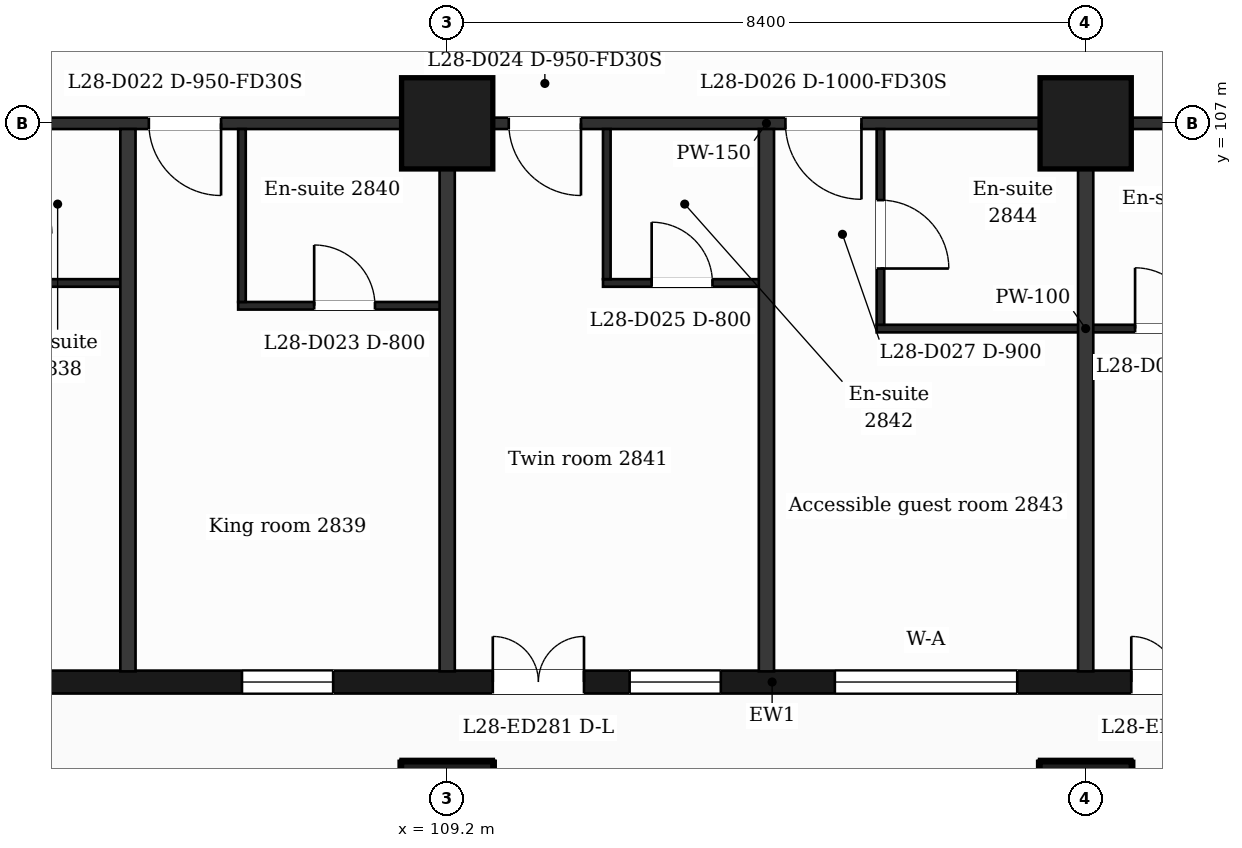
"""IFC4 building model, lengths in metres.
Left out: names, types, materials, properties, quantities, classifications, styles, units other than length and angle.
Written with IfcOpenShell. Run it as: python <this file> out.ifc"""

import sys

from ifc_helpers import new_model, si_unit, direction, frame, frame_2d, origin, origin_2d, place, context, subcontext, project, spatial, rectangle, extrude, element, fill, save


model = new_model("IFC4")
c1 = context("Model", 3, precision=1e-05, world=origin(), true_north=direction((0.0, 1.0)))
c2 = subcontext(c1, "Body", "Model", "MODEL_VIEW")
j1 = project(units=[si_unit("LENGTHUNIT", "METRE"), si_unit("PLANEANGLEUNIT", "RADIAN")], contexts=[c1])
p1 = place(None, origin())
s1 = spatial("IfcSite", under=j1, at=p1, CompositionType="ELEMENT")
p2 = place(p1, origin())
s2 = spatial("IfcBuilding", under=s1, at=p2, CompositionType="ELEMENT")
p3 = place(p2, frame((0.0, 0.0, 120.6)))
s3 = spatial("IfcBuildingStorey", under=s2, at=p3, CompositionType="ELEMENT", Elevation=120.6)
for number, where, z_axis, x_axis in (
    (1, (109.2, 98.0, 0.0), (0.0, 0.0, 1.0), (1.0, 0.0, 0.0)),
    (2, (117.6, 98.0, 0.0), (0.0, 0.0, 1.0), (1.0, 0.0, 0.0)),
    (3, (109.2, 107.0, 0.0), (0.0, 0.0, 1.0), (1.0, 0.0, 0.0)),
    (4, (117.6, 107.0, 0.0), (0.0, 0.0, 1.0), (1.0, 0.0, 0.0)),
):
    element("IfcColumn", number, at=place(p3, frame(where, z_axis=z_axis, x_axis=x_axis)), inside=s3, PredefinedType="COLUMN", context=c2, shape_type="SweptSolid", body=[
        extrude(rectangle(XDim=1.2, YDim=1.2, at=origin_2d()), origin(), (0.0, 0.0, 1.0), 3.7),
    ])
p4 = place(p3, frame((89.85, 99.65, 0.0), z_axis=(0.0, 0.0, 1.0), x_axis=(1.0, 0.0, 0.0)))
e5 = element("IfcWall", 5, at=p4, inside=s3, PredefinedType="SOLIDWALL", context=c2, shape_type="SweptSolid", body=[
    extrude(rectangle(XDim=47.25, YDim=0.3, at=frame_2d((23.625, 0.0))), origin(), (0.0, 0.0, 1.0), 3.38),
])
p5 = place(p4, frame((0.725, 0.0, 0.9)))
e6 = element("IfcOpeningElement", 6, at=p5, cuts=e5, PredefinedType="OPENING", context=c2, shape_type="SweptSolid", body=[
    extrude(rectangle(XDim=1.2, YDim=2.1, at=frame_2d((0.6, 1.05))), frame((0.0, 0.16, 0.0), z_axis=(0.0, -1.0, 0.0), x_axis=(1.0, 0.0, 0.0)), (0.0, 0.0, 1.0), 0.32),
])
p6 = place(p4, frame((3.45, 0.0, 0.9)))
e7 = element("IfcOpeningElement", 7, at=p6, cuts=e5, PredefinedType="OPENING", context=c2, shape_type="SweptSolid", body=[
    extrude(rectangle(XDim=2.4, YDim=2.1, at=frame_2d((1.2, 1.05))), frame((0.0, 0.16, 0.0), z_axis=(0.0, -1.0, 0.0), x_axis=(1.0, 0.0, 0.0)), (0.0, 0.0, 1.0), 0.32),
])
p7 = place(p4, frame((7.65, 0.0, 0.9)))
e8 = element("IfcOpeningElement", 8, at=p7, cuts=e5, PredefinedType="OPENING", context=c2, shape_type="SweptSolid", body=[
    extrude(rectangle(XDim=2.4, YDim=2.1, at=frame_2d((1.2, 1.05))), frame((0.0, 0.16, 0.0), z_axis=(0.0, -1.0, 0.0), x_axis=(1.0, 0.0, 0.0)), (0.0, 0.0, 1.0), 0.32),
])
p8 = place(p4, frame((12.45, 0.0, 0.9)))
e9 = element("IfcOpeningElement", 9, at=p8, cuts=e5, PredefinedType="OPENING", context=c2, shape_type="SweptSolid", body=[
    extrude(rectangle(XDim=1.2, YDim=2.1, at=frame_2d((0.6, 1.05))), frame((0.0, 0.16, 0.0), z_axis=(0.0, -1.0, 0.0), x_axis=(1.0, 0.0, 0.0)), (0.0, 0.0, 1.0), 0.32),
])
p9 = place(p4, frame((16.65, 0.0, 0.9)))
e10 = element("IfcOpeningElement", 10, at=p9, cuts=e5, PredefinedType="OPENING", context=c2, shape_type="SweptSolid", body=[
    extrude(rectangle(XDim=1.2, YDim=2.1, at=frame_2d((0.6, 1.05))), frame((0.0, 0.16, 0.0), z_axis=(0.0, -1.0, 0.0), x_axis=(1.0, 0.0, 0.0)), (0.0, 0.0, 1.0), 0.32),
])
p10 = place(p4, frame((19.95, 0.0, 0.0)))
e11 = element("IfcOpeningElement", 11, at=p10, cuts=e5, PredefinedType="OPENING", context=c2, shape_type="SweptSolid", body=[
    extrude(rectangle(XDim=1.2, YDim=2.4, at=frame_2d((0.6, 1.2))), frame((0.0, 0.16, 0.0), z_axis=(0.0, -1.0, 0.0), x_axis=(1.0, 0.0, 0.0)), (0.0, 0.0, 1.0), 0.32),
])
p11 = place(p4, frame((21.75, 0.0, 0.9)))
e12 = element("IfcOpeningElement", 12, at=p11, cuts=e5, PredefinedType="OPENING", context=c2, shape_type="SweptSolid", body=[
    extrude(rectangle(XDim=1.2, YDim=2.1, at=frame_2d((0.6, 1.05))), frame((0.0, 0.16, 0.0), z_axis=(0.0, -1.0, 0.0), x_axis=(1.0, 0.0, 0.0)), (0.0, 0.0, 1.0), 0.32),
])
p12 = place(p4, frame((24.45, 0.0, 0.9)))
e13 = element("IfcOpeningElement", 13, at=p12, cuts=e5, PredefinedType="OPENING", context=c2, shape_type="SweptSolid", body=[
    extrude(rectangle(XDim=2.4, YDim=2.1, at=frame_2d((1.2, 1.05))), frame((0.0, 0.16, 0.0), z_axis=(0.0, -1.0, 0.0), x_axis=(1.0, 0.0, 0.0)), (0.0, 0.0, 1.0), 0.32),
])
p13 = place(p4, frame((28.35, 0.0, 0.0)))
e14 = element("IfcOpeningElement", 14, at=p13, cuts=e5, PredefinedType="OPENING", context=c2, shape_type="SweptSolid", body=[
    extrude(rectangle(XDim=1.2, YDim=2.4, at=frame_2d((0.6, 1.2))), frame((0.0, 0.16, 0.0), z_axis=(0.0, -1.0, 0.0), x_axis=(1.0, 0.0, 0.0)), (0.0, 0.0, 1.0), 0.32),
])
p14 = place(p4, frame((30.15, 0.0, 0.9)))
e15 = element("IfcOpeningElement", 15, at=p14, cuts=e5, PredefinedType="OPENING", context=c2, shape_type="SweptSolid", body=[
    extrude(rectangle(XDim=1.2, YDim=2.1, at=frame_2d((0.6, 1.05))), frame((0.0, 0.16, 0.0), z_axis=(0.0, -1.0, 0.0), x_axis=(1.0, 0.0, 0.0)), (0.0, 0.0, 1.0), 0.32),
])
p15 = place(p4, frame((32.85, 0.0, 0.9)))
e16 = element("IfcOpeningElement", 16, at=p15, cuts=e5, PredefinedType="OPENING", context=c2, shape_type="SweptSolid", body=[
    extrude(rectangle(XDim=2.4, YDim=2.1, at=frame_2d((1.2, 1.05))), frame((0.0, 0.16, 0.0), z_axis=(0.0, -1.0, 0.0), x_axis=(1.0, 0.0, 0.0)), (0.0, 0.0, 1.0), 0.32),
])
p16 = place(p4, frame((37.05, 0.0, 0.9)))
e17 = element("IfcOpeningElement", 17, at=p16, cuts=e5, PredefinedType="OPENING", context=c2, shape_type="SweptSolid", body=[
    extrude(rectangle(XDim=2.4, YDim=2.1, at=frame_2d((1.2, 1.05))), frame((0.0, 0.16, 0.0), z_axis=(0.0, -1.0, 0.0), x_axis=(1.0, 0.0, 0.0)), (0.0, 0.0, 1.0), 0.32),
])
p17 = place(p4, frame((41.85, 0.0, 0.9)))
e18 = element("IfcOpeningElement", 18, at=p17, cuts=e5, PredefinedType="OPENING", context=c2, shape_type="SweptSolid", body=[
    extrude(rectangle(XDim=1.2, YDim=2.1, at=frame_2d((0.6, 1.05))), frame((0.0, 0.16, 0.0), z_axis=(0.0, -1.0, 0.0), x_axis=(1.0, 0.0, 0.0)), (0.0, 0.0, 1.0), 0.32),
])
p18 = place(p4, frame((45.25, 0.0, 0.9)))
e19 = element("IfcOpeningElement", 19, at=p18, cuts=e5, PredefinedType="OPENING", context=c2, shape_type="SweptSolid", body=[
    extrude(rectangle(XDim=1.2, YDim=2.1, at=frame_2d((0.6, 1.05))), frame((0.0, 0.16, 0.0), z_axis=(0.0, -1.0, 0.0), x_axis=(1.0, 0.0, 0.0)), (0.0, 0.0, 1.0), 0.32),
])
p19 = place(p3, frame((114.85, 104.3, 0.0), z_axis=(0.0, 0.0, 1.0), x_axis=(1.0, 0.0, 0.0)))
e20 = element("IfcWall", 20, at=p19, inside=s3, PredefinedType="PARTITIONING", context=c2, shape_type="SweptSolid", body=[
    extrude(rectangle(XDim=5.5, YDim=0.1, at=frame_2d((2.75, 0.0))), origin(), (0.0, 0.0, 1.0), 3.38),
])
p20 = place(p19, frame((3.4, 0.0, 0.0)))
e21 = element("IfcOpeningElement", 21, at=p20, cuts=e20, PredefinedType="OPENING", context=c2, shape_type="SweptSolid", body=[
    extrude(rectangle(XDim=0.8, YDim=2.1, at=frame_2d((0.4, 1.05))), frame((0.0, 0.06, 0.0), z_axis=(0.0, -1.0, 0.0), x_axis=(1.0, 0.0, 0.0)), (0.0, 0.0, 1.0), 0.12),
])
p21 = place(p3, frame((106.45, 104.6, 0.0), z_axis=(0.0, 0.0, 1.0), x_axis=(1.0, 0.0, 0.0)))
e22 = element("IfcWall", 22, at=p21, inside=s3, PredefinedType="PARTITIONING", context=c2, shape_type="SweptSolid", body=[
    extrude(rectangle(XDim=2.75, YDim=0.1, at=frame_2d((1.375, 0.0))), origin(), (0.0, 0.0, 1.0), 3.38),
])
p22 = place(p21, frame((1.0, 0.0, 0.0)))
e23 = element("IfcOpeningElement", 23, at=p22, cuts=e22, PredefinedType="OPENING", context=c2, shape_type="SweptSolid", body=[
    extrude(rectangle(XDim=0.8, YDim=2.1, at=frame_2d((0.4, 1.05))), frame((0.0, 0.06, 0.0), z_axis=(0.0, -1.0, 0.0), x_axis=(1.0, 0.0, 0.0)), (0.0, 0.0, 1.0), 0.12),
])
p23 = place(p3, frame((103.15, 104.9, 0.0), z_axis=(0.0, 0.0, 1.0), x_axis=(1.0, 0.0, 0.0)))
e24 = element("IfcWall", 24, at=p23, inside=s3, PredefinedType="PARTITIONING", context=c2, shape_type="SweptSolid", body=[
    extrude(rectangle(XDim=1.85, YDim=0.1, at=frame_2d((0.925, 0.0))), origin(), (0.0, 0.0, 1.0), 3.38),
])
p24 = place(p3, frame((111.25, 104.9, 0.0), z_axis=(0.0, 0.0, 1.0), x_axis=(1.0, 0.0, 0.0)))
e25 = element("IfcWall", 25, at=p24, inside=s3, PredefinedType="PARTITIONING", context=c2, shape_type="SweptSolid", body=[
    extrude(rectangle(XDim=2.15, YDim=0.1, at=frame_2d((1.075, 0.0))), origin(), (0.0, 0.0, 1.0), 3.38),
])
p25 = place(p24, frame((0.64, 0.0, 0.0)))
e26 = element("IfcOpeningElement", 26, at=p25, cuts=e25, PredefinedType="OPENING", context=c2, shape_type="SweptSolid", body=[
    extrude(rectangle(XDim=0.8, YDim=2.1, at=frame_2d((0.4, 1.05))), frame((0.0, 0.06, 0.0), z_axis=(0.0, -1.0, 0.0), x_axis=(1.0, 0.0, 0.0)), (0.0, 0.0, 1.0), 0.12),
])
p26 = place(p3, frame((87.018, 107.0, 0.0), z_axis=(0.0, 0.0, 1.0), x_axis=(1.0, 0.0, 0.0)))
e27 = element("IfcWall", 27, at=p26, inside=s3, PredefinedType="PARTITIONING", context=c2, shape_type="SweptSolid", body=[
    extrude(rectangle(XDim=52.765, YDim=0.15, at=frame_2d((26.382, 0.0))), origin(), (0.0, 0.0, 1.0), 3.38),
])
p27 = place(p26, frame((1.276, 0.0, 0.0)))
e28 = element("IfcOpeningElement", 28, at=p27, cuts=e27, PredefinedType="OPENING", context=c2, shape_type="SweptSolid", body=[
    extrude(rectangle(XDim=0.95, YDim=2.1, at=frame_2d((0.475, 1.05))), frame((0.0, 0.085, 0.0), z_axis=(0.0, -1.0, 0.0), x_axis=(1.0, 0.0, 0.0)), (0.0, 0.0, 1.0), 0.17),
])
p28 = place(p26, frame((6.192, 0.0, 0.0)))
e29 = element("IfcOpeningElement", 29, at=p28, cuts=e27, PredefinedType="OPENING", context=c2, shape_type="SweptSolid", body=[
    extrude(rectangle(XDim=0.95, YDim=2.1, at=frame_2d((0.475, 1.05))), frame((0.0, 0.085, 0.0), z_axis=(0.0, -1.0, 0.0), x_axis=(1.0, 0.0, 0.0)), (0.0, 0.0, 1.0), 0.17),
])
p29 = place(p26, frame((11.982, 0.0, 0.0)))
e30 = element("IfcOpeningElement", 30, at=p29, cuts=e27, PredefinedType="OPENING", context=c2, shape_type="SweptSolid", body=[
    extrude(rectangle(XDim=1.0, YDim=2.1, at=frame_2d((0.5, 1.05))), frame((0.0, 0.085, 0.0), z_axis=(0.0, -1.0, 0.0), x_axis=(1.0, 0.0, 0.0)), (0.0, 0.0, 1.0), 0.17),
])
p30 = place(p26, frame((14.582, 0.0, 0.0)))
e31 = element("IfcOpeningElement", 31, at=p30, cuts=e27, PredefinedType="OPENING", context=c2, shape_type="SweptSolid", body=[
    extrude(rectangle(XDim=0.95, YDim=2.1, at=frame_2d((0.475, 1.05))), frame((0.0, 0.085, 0.0), z_axis=(0.0, -1.0, 0.0), x_axis=(1.0, 0.0, 0.0)), (0.0, 0.0, 1.0), 0.17),
])
p31 = place(p26, frame((18.257, 0.0, 0.0)))
e32 = element("IfcOpeningElement", 32, at=p31, cuts=e27, PredefinedType="OPENING", context=c2, shape_type="SweptSolid", body=[
    extrude(rectangle(XDim=0.95, YDim=2.1, at=frame_2d((0.475, 1.05))), frame((0.0, 0.085, 0.0), z_axis=(0.0, -1.0, 0.0), x_axis=(1.0, 0.0, 0.0)), (0.0, 0.0, 1.0), 0.17),
])
p32 = place(p26, frame((22.992, 0.0, 0.0)))
e33 = element("IfcOpeningElement", 33, at=p32, cuts=e27, PredefinedType="OPENING", context=c2, shape_type="SweptSolid", body=[
    extrude(rectangle(XDim=0.95, YDim=2.1, at=frame_2d((0.475, 1.05))), frame((0.0, 0.085, 0.0), z_axis=(0.0, -1.0, 0.0), x_axis=(1.0, 0.0, 0.0)), (0.0, 0.0, 1.0), 0.17),
])
p33 = place(p26, frame((26.632, 0.0, 0.0)))
e34 = element("IfcOpeningElement", 34, at=p33, cuts=e27, PredefinedType="OPENING", context=c2, shape_type="SweptSolid", body=[
    extrude(rectangle(XDim=1.0, YDim=2.1, at=frame_2d((0.5, 1.05))), frame((0.0, 0.085, 0.0), z_axis=(0.0, -1.0, 0.0), x_axis=(1.0, 0.0, 0.0)), (0.0, 0.0, 1.0), 0.17),
])
p34 = place(p26, frame((33.557, 0.0, 0.0)))
e35 = element("IfcOpeningElement", 35, at=p34, cuts=e27, PredefinedType="OPENING", context=c2, shape_type="SweptSolid", body=[
    extrude(rectangle(XDim=0.95, YDim=2.1, at=frame_2d((0.475, 1.05))), frame((0.0, 0.085, 0.0), z_axis=(0.0, -1.0, 0.0), x_axis=(1.0, 0.0, 0.0)), (0.0, 0.0, 1.0), 0.17),
])
p35 = place(p26, frame((37.182, 0.0, 0.0)))
e36 = element("IfcOpeningElement", 36, at=p35, cuts=e27, PredefinedType="OPENING", context=c2, shape_type="SweptSolid", body=[
    extrude(rectangle(XDim=0.95, YDim=2.1, at=frame_2d((0.475, 1.05))), frame((0.0, 0.085, 0.0), z_axis=(0.0, -1.0, 0.0), x_axis=(1.0, 0.0, 0.0)), (0.0, 0.0, 1.0), 0.17),
])
p36 = place(p26, frame((41.957, 0.0, 0.0)))
e37 = element("IfcOpeningElement", 37, at=p36, cuts=e27, PredefinedType="OPENING", context=c2, shape_type="SweptSolid", body=[
    extrude(rectangle(XDim=0.95, YDim=2.1, at=frame_2d((0.475, 1.05))), frame((0.0, 0.085, 0.0), z_axis=(0.0, -1.0, 0.0), x_axis=(1.0, 0.0, 0.0)), (0.0, 0.0, 1.0), 0.17),
])
p37 = place(p26, frame((45.622, 0.0, 0.0)))
e38 = element("IfcOpeningElement", 38, at=p37, cuts=e27, PredefinedType="OPENING", context=c2, shape_type="SweptSolid", body=[
    extrude(rectangle(XDim=0.95, YDim=2.1, at=frame_2d((0.475, 1.05))), frame((0.0, 0.085, 0.0), z_axis=(0.0, -1.0, 0.0), x_axis=(1.0, 0.0, 0.0)), (0.0, 0.0, 1.0), 0.17),
])
p38 = place(p26, frame((48.56, 0.0, 0.0)))
e39 = element("IfcOpeningElement", 39, at=p38, cuts=e27, PredefinedType="OPENING", context=c2, shape_type="SweptSolid", body=[
    extrude(rectangle(XDim=0.95, YDim=2.1, at=frame_2d((0.475, 1.05))), frame((0.0, 0.085, 0.0), z_axis=(0.0, -1.0, 0.0), x_axis=(1.0, 0.0, 0.0)), (0.0, 0.0, 1.0), 0.17),
])
p39 = place(p3, frame((105.0, 99.79, 0.0), z_axis=(0.0, 0.0, 1.0), x_axis=(0.0, 1.0, 0.0)))
e40 = element("IfcWall", 40, at=p39, inside=s3, PredefinedType="PARTITIONING", context=c2, shape_type="SweptSolid", body=[
    extrude(rectangle(XDim=7.135, YDim=0.2, at=frame_2d((3.567, 0.0))), origin(), (0.0, 0.0, 1.0), 3.38),
])
p40 = place(p3, frame((106.5, 104.65, 0.0), z_axis=(0.0, 0.0, 1.0), x_axis=(0.0, 1.0, 0.0)))
e41 = element("IfcWall", 41, at=p40, inside=s3, PredefinedType="PARTITIONING", context=c2, shape_type="SweptSolid", body=[
    extrude(rectangle(XDim=2.275, YDim=0.1, at=frame_2d((1.138, 0.0))), origin(), (0.0, 0.0, 1.0), 3.38),
])
p41 = place(p3, frame((109.2, 99.79, 0.0), z_axis=(0.0, 0.0, 1.0), x_axis=(0.0, 1.0, 0.0)))
e42 = element("IfcWall", 42, at=p41, inside=s3, PredefinedType="PARTITIONING", context=c2, shape_type="SweptSolid", body=[
    extrude(rectangle(XDim=7.135, YDim=0.2, at=frame_2d((3.567, 0.0))), origin(), (0.0, 0.0, 1.0), 3.38),
])
p42 = place(p3, frame((111.3, 104.95, 0.0), z_axis=(0.0, 0.0, 1.0), x_axis=(0.0, 1.0, 0.0)))
e43 = element("IfcWall", 43, at=p42, inside=s3, PredefinedType="PARTITIONING", context=c2, shape_type="SweptSolid", body=[
    extrude(rectangle(XDim=1.975, YDim=0.1, at=frame_2d((0.988, 0.0))), origin(), (0.0, 0.0, 1.0), 3.38),
])
p43 = place(p3, frame((113.4, 99.79, 0.0), z_axis=(0.0, 0.0, 1.0), x_axis=(0.0, 1.0, 0.0)))
e44 = element("IfcWall", 44, at=p43, inside=s3, PredefinedType="PARTITIONING", context=c2, shape_type="SweptSolid", body=[
    extrude(rectangle(XDim=7.135, YDim=0.2, at=frame_2d((3.567, 0.0))), origin(), (0.0, 0.0, 1.0), 3.38),
])
p44 = place(p3, frame((114.9, 104.35, 0.0), z_axis=(0.0, 0.0, 1.0), x_axis=(0.0, 1.0, 0.0)))
e45 = element("IfcWall", 45, at=p44, inside=s3, PredefinedType="PARTITIONING", context=c2, shape_type="SweptSolid", body=[
    extrude(rectangle(XDim=2.575, YDim=0.1, at=frame_2d((1.288, 0.0))), origin(), (0.0, 0.0, 1.0), 3.38),
])
p45 = place(p44, frame((0.74, 0.0, 0.0)))
e46 = element("IfcOpeningElement", 46, at=p45, cuts=e45, PredefinedType="OPENING", context=c2, shape_type="SweptSolid", body=[
    extrude(rectangle(XDim=0.9, YDim=2.1, at=frame_2d((0.45, 1.05))), frame((0.0, 0.06, 0.0), z_axis=(0.0, -1.0, 0.0), x_axis=(1.0, 0.0, 0.0)), (0.0, 0.0, 1.0), 0.12),
])
p46 = place(p3, frame((117.6, 99.79, 0.0), z_axis=(0.0, 0.0, 1.0), x_axis=(0.0, 1.0, 0.0)))
e47 = element("IfcWall", 47, at=p46, inside=s3, PredefinedType="PARTITIONING", context=c2, shape_type="SweptSolid", body=[
    extrude(rectangle(XDim=7.135, YDim=0.2, at=frame_2d((3.567, 0.0))), origin(), (0.0, 0.0, 1.0), 3.38),
])
p47 = place(p9, origin())
e48 = element("IfcWindow", 48, at=p47, inside=s3, PartitioningType="SINGLE_PANEL", PredefinedType="WINDOW", context=c2, shape_type="SweptSolid", body=[
    extrude(rectangle(XDim=1.2, YDim=2.1, at=frame_2d((0.6, 1.05))), frame((0.0, 0.03, 0.0), z_axis=(0.0, -1.0, 0.0), x_axis=(1.0, 0.0, 0.0)), (0.0, 0.0, 1.0), 0.06),
])
fill(e10, e48)
p48 = place(p10, origin())
e49 = element("IfcDoor", 49, at=p48, inside=s3, OperationType="DOUBLE_DOOR_SINGLE_SWING", PredefinedType="DOOR", context=c2, shape_type="SweptSolid", body=[
    extrude(rectangle(XDim=1.2, YDim=2.4, at=frame_2d((0.6, 1.2))), frame((0.0, 0.025, 0.0), z_axis=(0.0, -1.0, 0.0), x_axis=(1.0, 0.0, 0.0)), (0.0, 0.0, 1.0), 0.05),
])
fill(e11, e49)
p49 = place(p11, origin())
e50 = element("IfcWindow", 50, at=p49, inside=s3, PartitioningType="SINGLE_PANEL", PredefinedType="WINDOW", context=c2, shape_type="SweptSolid", body=[
    extrude(rectangle(XDim=1.2, YDim=2.1, at=frame_2d((0.6, 1.05))), frame((0.0, 0.03, 0.0), z_axis=(0.0, -1.0, 0.0), x_axis=(1.0, 0.0, 0.0)), (0.0, 0.0, 1.0), 0.06),
])
fill(e12, e50)
p50 = place(p12, origin())
e51 = element("IfcWindow", 51, at=p50, inside=s3, PartitioningType="SINGLE_PANEL", PredefinedType="WINDOW", context=c2, shape_type="SweptSolid", body=[
    extrude(rectangle(XDim=2.4, YDim=2.1, at=frame_2d((1.2, 1.05))), frame((0.0, 0.03, 0.0), z_axis=(0.0, -1.0, 0.0), x_axis=(1.0, 0.0, 0.0)), (0.0, 0.0, 1.0), 0.06),
])
fill(e13, e51)
p51 = place(p13, origin())
e52 = element("IfcDoor", 52, at=p51, inside=s3, OperationType="DOUBLE_DOOR_SINGLE_SWING", PredefinedType="DOOR", context=c2, shape_type="SweptSolid", body=[
    extrude(rectangle(XDim=1.2, YDim=2.4, at=frame_2d((0.6, 1.2))), frame((0.0, 0.025, 0.0), z_axis=(0.0, -1.0, 0.0), x_axis=(1.0, 0.0, 0.0)), (0.0, 0.0, 1.0), 0.05),
])
fill(e14, e52)
p52 = place(p31, origin())
e53 = element("IfcDoor", 53, at=p52, inside=s3, OperationType="SINGLE_SWING_RIGHT", PredefinedType="DOOR", context=c2, shape_type="SweptSolid", body=[
    extrude(rectangle(XDim=0.95, YDim=2.1, at=frame_2d((0.475, 1.05))), frame((0.0, 0.025, 0.0), z_axis=(0.0, -1.0, 0.0), x_axis=(1.0, 0.0, 0.0)), (0.0, 0.0, 1.0), 0.05),
])
fill(e32, e53)
p53 = place(p22, origin())
e54 = element("IfcDoor", 54, at=p53, inside=s3, OperationType="SINGLE_SWING_LEFT", PredefinedType="DOOR", context=c2, shape_type="SweptSolid", body=[
    extrude(rectangle(XDim=0.8, YDim=2.1, at=frame_2d((0.4, 1.05))), frame((0.0, 0.025, 0.0), z_axis=(0.0, -1.0, 0.0), x_axis=(1.0, 0.0, 0.0)), (0.0, 0.0, 1.0), 0.05),
])
fill(e23, e54)
p54 = place(p32, origin())
e55 = element("IfcDoor", 55, at=p54, inside=s3, OperationType="SINGLE_SWING_RIGHT", PredefinedType="DOOR", context=c2, shape_type="SweptSolid", body=[
    extrude(rectangle(XDim=0.95, YDim=2.1, at=frame_2d((0.475, 1.05))), frame((0.0, 0.025, 0.0), z_axis=(0.0, -1.0, 0.0), x_axis=(1.0, 0.0, 0.0)), (0.0, 0.0, 1.0), 0.05),
])
fill(e33, e55)
p55 = place(p25, origin())
e56 = element("IfcDoor", 56, at=p55, inside=s3, OperationType="SINGLE_SWING_LEFT", PredefinedType="DOOR", context=c2, shape_type="SweptSolid", body=[
    extrude(rectangle(XDim=0.8, YDim=2.1, at=frame_2d((0.4, 1.05))), frame((0.0, 0.025, 0.0), z_axis=(0.0, -1.0, 0.0), x_axis=(1.0, 0.0, 0.0)), (0.0, 0.0, 1.0), 0.05),
])
fill(e26, e56)
p56 = place(p33, origin())
e57 = element("IfcDoor", 57, at=p56, inside=s3, OperationType="SINGLE_SWING_RIGHT", PredefinedType="DOOR", context=c2, shape_type="SweptSolid", body=[
    extrude(rectangle(XDim=1.0, YDim=2.1, at=frame_2d((0.5, 1.05))), frame((0.0, 0.025, 0.0), z_axis=(0.0, -1.0, 0.0), x_axis=(1.0, 0.0, 0.0)), (0.0, 0.0, 1.0), 0.05),
])
fill(e34, e57)
p57 = place(p45, origin())
e58 = element("IfcDoor", 58, at=p57, inside=s3, OperationType="SINGLE_SWING_LEFT", PredefinedType="DOOR", context=c2, shape_type="SweptSolid", body=[
    extrude(rectangle(XDim=0.9, YDim=2.1, at=frame_2d((0.45, 1.05))), frame((0.0, 0.025, 0.0), z_axis=(0.0, -1.0, 0.0), x_axis=(1.0, 0.0, 0.0)), (0.0, 0.0, 1.0), 0.05),
])
fill(e46, e58)
p58 = place(p20, origin())
e59 = element("IfcDoor", 59, at=p58, inside=s3, OperationType="SINGLE_SWING_LEFT", PredefinedType="DOOR", context=c2, shape_type="SweptSolid", body=[
    extrude(rectangle(XDim=0.8, YDim=2.1, at=frame_2d((0.4, 1.05))), frame((0.0, 0.025, 0.0), z_axis=(0.0, -1.0, 0.0), x_axis=(1.0, 0.0, 0.0)), (0.0, 0.0, 1.0), 0.05),
])
fill(e21, e59)
save(model, sys.argv[1])
